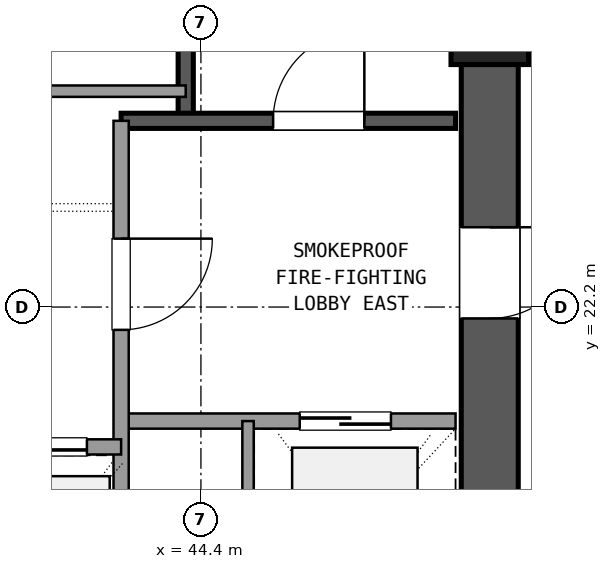
"""IFC4 building model, lengths in metres.
Left out: names, types, materials, properties, quantities, classifications, styles, units other than length and angle.
Written with IfcOpenShell. Run it as: python <this file> out.ifc"""

import sys

from ifc_helpers import new_model, si_unit, direction, frame, frame_2d, origin, origin_2d, place, context, subcontext, project, spatial, rectangle, extrude, element, fill, save


model = new_model("IFC4")
c1 = context("Model", 3, precision=1e-05, world=origin(), true_north=direction((0.0, 1.0)))
c2 = subcontext(c1, "Body", "Model", "MODEL_VIEW")
j1 = project(units=[si_unit("LENGTHUNIT", "METRE"), si_unit("PLANEANGLEUNIT", "RADIAN")], contexts=[c1])
p1 = place(None, origin())
s1 = spatial("IfcSite", under=j1, at=p1, CompositionType="ELEMENT")
p2 = place(p1, origin())
s2 = spatial("IfcBuilding", under=s1, at=p2, CompositionType="ELEMENT")
p3 = place(p2, frame((0.0, 0.0, 81.18)))
s3 = spatial("IfcBuildingStorey", under=s2, at=p3, CompositionType="ELEMENT", Elevation=81.18)
p4 = place(p3, frame((48.2, 25.9, 0.0), z_axis=(0.0, 0.0, 1.0), x_axis=(1.0, 0.0, 0.0)))
e1 = element("IfcColumn", 1, at=p4, inside=s3, PredefinedType="COLUMN", context=c2, shape_type="SweptSolid", body=[
    extrude(rectangle(XDim=1.02, YDim=1.02, at=origin_2d()), origin(), (0.0, 0.0, 1.0), 3.6),
])
p5 = place(p3, frame((48.2, 17.805, 0.0), z_axis=(0.0, 0.0, 1.0), x_axis=(0.0, 1.0, 0.0)))
e2 = element("IfcWall", 2, at=p5, inside=s3, PredefinedType="SHEAR", context=c2, shape_type="SweptSolid", body=[
    extrude(rectangle(XDim=7.59, YDim=0.75, at=frame_2d((3.795, 0.0))), origin(), (0.0, 0.0, 1.0), 3.32),
])
p6 = place(p5, frame((4.245, 0.0, 0.0)))
e3 = element("IfcOpeningElement", 3, at=p6, cuts=e2, PredefinedType="OPENING", context=c2, shape_type="SweptSolid", body=[
    extrude(rectangle(XDim=1.2, YDim=2.15, at=frame_2d((0.6, 1.075))), frame((0.0, 0.385, 0.0), z_axis=(0.0, -1.0, 0.0), x_axis=(1.0, 0.0, 0.0)), (0.0, 0.0, 1.0), 0.77),
])
p7 = place(p3, frame((44.2, 24.65, 0.0), z_axis=(0.0, 0.0, 1.0), x_axis=(0.0, 1.0, 0.0)))
e4 = element("IfcWall", 4, at=p7, inside=s3, PredefinedType="SHEAR", context=c2, shape_type="SweptSolid", body=[
    extrude(rectangle(XDim=9.4, YDim=0.2, at=frame_2d((4.7, 0.0))), origin(), (0.0, 0.0, 1.0), 3.32),
])
p8 = place(p3, frame((43.35, 24.65, 0.0), z_axis=(0.0, 0.0, 1.0), x_axis=(1.0, 0.0, 0.0)))
e5 = element("IfcWall", 5, at=p8, inside=s3, PredefinedType="SHEAR", context=c2, shape_type="SweptSolid", body=[
    extrude(rectangle(XDim=4.4, YDim=0.2, at=frame_2d((2.2, 0.0))), origin(), (0.0, 0.0, 1.0), 3.32),
])
p9 = place(p8, frame((2.0, 0.0, 0.0)))
e6 = element("IfcOpeningElement", 6, at=p9, cuts=e5, PredefinedType="OPENING", context=c2, shape_type="SweptSolid", body=[
    extrude(rectangle(XDim=1.2, YDim=2.15, at=frame_2d((0.6, 1.075))), frame((0.0, 0.11, 0.0), z_axis=(0.0, -1.0, 0.0), x_axis=(1.0, 0.0, 0.0)), (0.0, 0.0, 1.0), 0.22),
])
p10 = place(p3, frame((43.35, 20.7, 0.0), z_axis=(0.0, 0.0, 1.0), x_axis=(1.0, 0.0, 0.0)))
e7 = element("IfcWall", 7, at=p10, inside=s3, PredefinedType="SOLIDWALL", context=c2, shape_type="SweptSolid", body=[
    extrude(rectangle(XDim=4.4, YDim=0.2, at=frame_2d((2.2, 0.0))), origin(), (0.0, 0.0, 1.0), 2.61),
])
p11 = place(p10, frame((2.35, 0.0, 0.0)))
e8 = element("IfcOpeningElement", 8, at=p11, cuts=e7, PredefinedType="OPENING", context=c2, shape_type="SweptSolid", body=[
    extrude(rectangle(XDim=1.2, YDim=2.15, at=frame_2d((0.6, 1.075))), frame((0.0, 0.11, 0.0), z_axis=(0.0, -1.0, 0.0), x_axis=(1.0, 0.0, 0.0)), (0.0, 0.0, 1.0), 0.22),
])
p12 = place(p3, frame((43.35, 17.75, 0.0), z_axis=(0.0, 0.0, 1.0), x_axis=(0.0, 1.0, 0.0)))
e9 = element("IfcWall", 9, at=p12, inside=s3, PredefinedType="SOLIDWALL", context=c2, shape_type="SweptSolid", body=[
    extrude(rectangle(XDim=6.9, YDim=0.2, at=frame_2d((3.45, 0.0))), origin(), (0.0, 0.0, 1.0), 2.61),
])
p13 = place(p12, frame((4.15, 0.0, 0.0)))
e10 = element("IfcOpeningElement", 10, at=p13, cuts=e9, PredefinedType="OPENING", context=c2, shape_type="SweptSolid", body=[
    extrude(rectangle(XDim=1.2, YDim=2.15, at=frame_2d((0.6, 1.075))), frame((0.0, 0.11, 0.0), z_axis=(0.0, -1.0, 0.0), x_axis=(1.0, 0.0, 0.0)), (0.0, 0.0, 1.0), 0.22),
])
p14 = place(p3, frame((45.02, 17.75, 0.0), z_axis=(0.0, 0.0, 1.0), x_axis=(0.0, 1.0, 0.0)))
e11 = element("IfcWall", 11, at=p14, inside=s3, PredefinedType="PARTITIONING", context=c2, shape_type="SweptSolid", body=[
    extrude(rectangle(XDim=2.95, YDim=0.15, at=frame_2d((1.475, 0.0))), origin(), (0.0, 0.0, 1.0), 2.61),
])
p15 = place(p3, frame((37.25, 20.36, 0.0), z_axis=(0.0, 0.0, 1.0), x_axis=(1.0, 0.0, 0.0)))
e12 = element("IfcWall", 12, at=p15, inside=s3, PredefinedType="SOLIDWALL", context=c2, shape_type="SweptSolid", body=[
    extrude(rectangle(XDim=6.1, YDim=0.2, at=frame_2d((3.05, 0.0))), origin(), (0.0, 0.0, 1.0), 2.61),
])
p16 = place(p15, frame((0.45, 0.0, 0.0)))
e13 = element("IfcOpeningElement", 13, at=p16, cuts=e12, PredefinedType="OPENING", context=c2, shape_type="SweptSolid", body=[
    extrude(rectangle(XDim=1.1, YDim=2.15, at=frame_2d((0.55, 1.075))), frame((0.0, 0.11, 0.0), z_axis=(0.0, -1.0, 0.0), x_axis=(1.0, 0.0, 0.0)), (0.0, 0.0, 1.0), 0.22),
])
p17 = place(p15, frame((2.5, 0.0, 0.0)))
e14 = element("IfcOpeningElement", 14, at=p17, cuts=e12, PredefinedType="OPENING", context=c2, shape_type="SweptSolid", body=[
    extrude(rectangle(XDim=1.1, YDim=2.15, at=frame_2d((0.55, 1.075))), frame((0.0, 0.11, 0.0), z_axis=(0.0, -1.0, 0.0), x_axis=(1.0, 0.0, 0.0)), (0.0, 0.0, 1.0), 0.22),
])
p18 = place(p15, frame((4.55, 0.0, 0.0)))
e15 = element("IfcOpeningElement", 15, at=p18, cuts=e12, PredefinedType="OPENING", context=c2, shape_type="SweptSolid", body=[
    extrude(rectangle(XDim=1.1, YDim=2.15, at=frame_2d((0.55, 1.075))), frame((0.0, 0.11, 0.0), z_axis=(0.0, -1.0, 0.0), x_axis=(1.0, 0.0, 0.0)), (0.0, 0.0, 1.0), 0.22),
])
p19 = place(p3, frame((42.27, 25.04, 0.0), z_axis=(0.0, 0.0, 1.0), x_axis=(1.0, 0.0, 0.0)))
e16 = element("IfcWall", 16, at=p19, inside=s3, PredefinedType="PARTITIONING", context=c2, shape_type="SweptSolid", body=[
    extrude(rectangle(XDim=1.93, YDim=0.15, at=frame_2d((0.965, 0.0))), origin(), (0.0, 0.0, 1.0), 2.61),
])
p20 = place(p9, origin())
e17 = element("IfcDoor", 17, at=p20, inside=s3, OperationType="SINGLE_SWING_RIGHT", PredefinedType="DOOR", context=c2, shape_type="SweptSolid", body=[
    extrude(rectangle(XDim=1.2, YDim=2.15, at=frame_2d((0.6, 1.075))), frame((0.0, 0.025, 0.0), z_axis=(0.0, -1.0, 0.0), x_axis=(1.0, 0.0, 0.0)), (0.0, 0.0, 1.0), 0.05),
])
fill(e6, e17)
p21 = place(p11, origin())
e18 = element("IfcDoor", 18, at=p21, inside=s3, OperationType="SLIDING_TO_RIGHT", PredefinedType="DOOR", context=c2, shape_type="SweptSolid", body=[
    extrude(rectangle(XDim=1.2, YDim=2.15, at=frame_2d((0.6, 1.075))), frame((0.0, 0.025, 0.0), z_axis=(0.0, -1.0, 0.0), x_axis=(1.0, 0.0, 0.0)), (0.0, 0.0, 1.0), 0.05),
])
fill(e8, e18)
p22 = place(p13, frame((1.2, 0.0, 0.0), z_axis=(0.0, 0.0, 1.0), x_axis=(-1.0, 0.0, 0.0)))
e19 = element("IfcDoor", 19, at=p22, inside=s3, OperationType="SINGLE_SWING_RIGHT", PredefinedType="DOOR", context=c2, shape_type="SweptSolid", body=[
    extrude(rectangle(XDim=1.2, YDim=2.15, at=frame_2d((0.6, 1.075))), frame((0.0, 0.025, 0.0), z_axis=(0.0, -1.0, 0.0), x_axis=(1.0, 0.0, 0.0)), (0.0, 0.0, 1.0), 0.05),
])
fill(e10, e19)
p23 = place(p6, frame((1.2, 0.0, 0.0), z_axis=(0.0, 0.0, 1.0), x_axis=(-1.0, 0.0, 0.0)))
e20 = element("IfcDoor", 20, at=p23, inside=s3, OperationType="SINGLE_SWING_RIGHT", PredefinedType="DOOR", context=c2, shape_type="SweptSolid", body=[
    extrude(rectangle(XDim=1.2, YDim=2.15, at=frame_2d((0.6, 1.075))), frame((0.0, 0.025, 0.0), z_axis=(0.0, -1.0, 0.0), x_axis=(1.0, 0.0, 0.0)), (0.0, 0.0, 1.0), 0.05),
])
fill(e3, e20)
p24 = place(p18, origin())
e21 = element("IfcDoor", 21, at=p24, inside=s3, OperationType="SLIDING_TO_LEFT", PredefinedType="DOOR", context=c2, shape_type="SweptSolid", body=[
    extrude(rectangle(XDim=1.1, YDim=2.15, at=frame_2d((0.55, 1.075))), frame((0.0, 0.025, 0.0), z_axis=(0.0, -1.0, 0.0), x_axis=(1.0, 0.0, 0.0)), (0.0, 0.0, 1.0), 0.05),
])
fill(e15, e21)
save(model, sys.argv[1])
